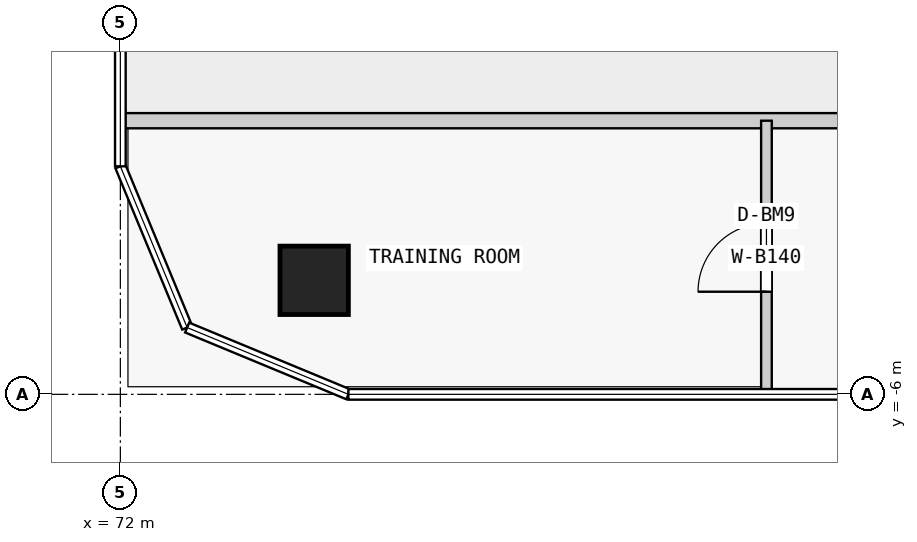
"""IFC4 building model, lengths in metres.
Left out: names, types, materials, properties, quantities, classifications, styles, units other than length and angle.
Written with IfcOpenShell. Run it as: python <this file> out.ifc"""

import sys

from ifc_helpers import new_model, si_unit, direction, frame, frame_2d, origin, origin_2d, place, context, subcontext, project, spatial, rectangle, extrude, element, fill, save


model = new_model("IFC4")
c1 = context("Model", 3, precision=1e-05, world=origin(), true_north=direction((0.0, 1.0)))
c2 = subcontext(c1, "Body", "Model", "MODEL_VIEW")
j1 = project(units=[si_unit("LENGTHUNIT", "METRE"), si_unit("PLANEANGLEUNIT", "RADIAN")], contexts=[c1])
p1 = place(None, origin())
s1 = spatial("IfcSite", under=j1, at=p1, CompositionType="ELEMENT")
p2 = place(p1, origin())
s2 = spatial("IfcBuilding", under=s1, at=p2, CompositionType="ELEMENT")
p3 = place(p2, frame((0.0, 0.0, 44.3)))
s3 = spatial("IfcBuildingStorey", under=s2, at=p3, CompositionType="ELEMENT", Elevation=44.3)
p4 = place(p3, frame((74.55, -4.5, 0.0), z_axis=(0.0, 0.0, 1.0), x_axis=(1.0, 0.0, 0.0)))
e1 = element("IfcColumn", 1, at=p4, inside=s3, PredefinedType="COLUMN", context=c2, shape_type="SweptSolid", body=[
    extrude(rectangle(XDim=0.9, YDim=0.9, at=origin_2d()), origin(), (0.0, 0.0, 1.0), 3.5),
])
p5 = place(p3, frame((72.0, -2.4, 0.0), z_axis=(0.0, 0.0, 1.0), x_axis=(1.0, 0.0, 0.0)))
e2 = element("IfcWall", 2, at=p5, inside=s3, PredefinedType="PARTITIONING", context=c2, shape_type="SweptSolid", body=[
    extrude(rectangle(XDim=20.0, YDim=0.2, at=frame_2d((10.0, 0.0))), origin(), (0.0, 0.0, 1.0), 3.25),
])
p6 = place(p5, frame((11.1, 0.0, 0.0)))
e3 = element("IfcOpeningElement", 3, at=p6, cuts=e2, PredefinedType="OPENING", context=c2, shape_type="SweptSolid", body=[
    extrude(rectangle(XDim=1.8, YDim=2.1, at=frame_2d((0.9, 1.05))), frame((0.0, 0.11, 0.0), z_axis=(0.0, -1.0, 0.0), x_axis=(1.0, 0.0, 0.0)), (0.0, 0.0, 1.0), 0.22),
])
p7 = place(p3, frame((80.5, -6.0, 0.0), z_axis=(0.0, 0.0, 1.0), x_axis=(0.0, 1.0, 0.0)))
e4 = element("IfcWall", 4, at=p7, inside=s3, PredefinedType="PARTITIONING", context=c2, shape_type="SweptSolid", body=[
    extrude(rectangle(XDim=3.6, YDim=0.14, at=frame_2d((1.8, 0.0))), origin(), (0.0, 0.0, 1.0), 3.25),
])
p8 = place(p7, frame((1.35, 0.0, 0.0)))
e5 = element("IfcOpeningElement", 5, at=p8, cuts=e4, PredefinedType="OPENING", context=c2, shape_type="SweptSolid", body=[
    extrude(rectangle(XDim=0.9, YDim=2.4, at=frame_2d((0.45, 1.2))), frame((0.0, 0.08, 0.0), z_axis=(0.0, -1.0, 0.0), x_axis=(1.0, 0.0, 0.0)), (0.0, 0.0, 1.0), 0.16),
])
p9 = place(p8, origin())
e6 = element("IfcDoor", 6, at=p9, inside=s3, OperationType="SINGLE_SWING_LEFT", PredefinedType="DOOR", context=c2, shape_type="SweptSolid", body=[
    extrude(rectangle(XDim=0.9, YDim=2.4, at=frame_2d((0.45, 1.2))), frame((0.0, 0.025, 0.0), z_axis=(0.0, -1.0, 0.0), x_axis=(1.0, 0.0, 0.0)), (0.0, 0.0, 1.0), 0.05),
])
fill(e5, e6)
save(model, sys.argv[1])
